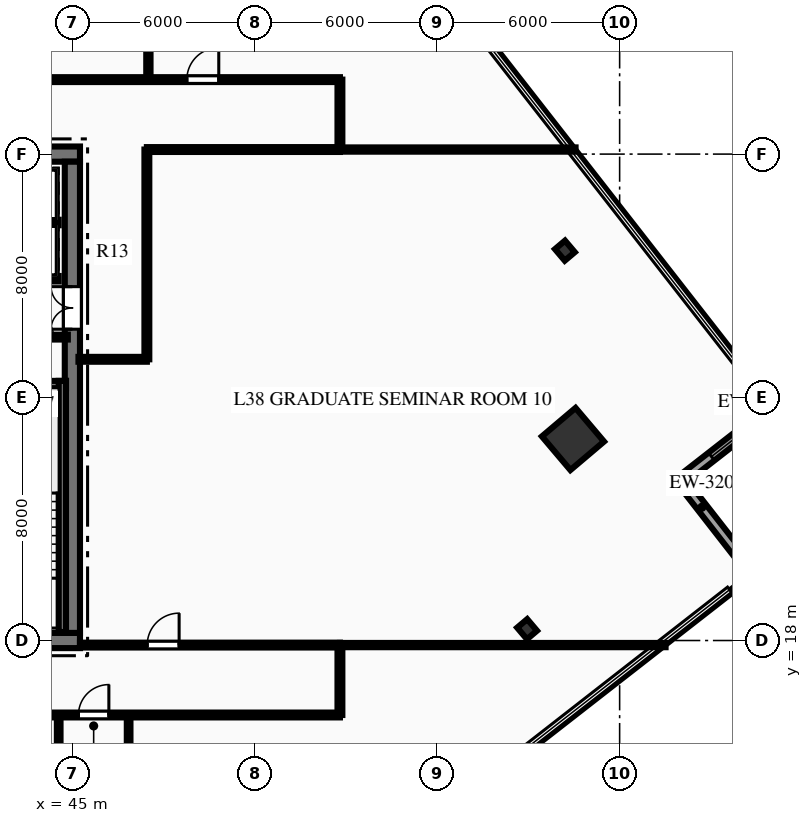
"""IFC4 building model, lengths in metres.
Left out: names, types, materials, properties, quantities, classifications, styles, units other than length and angle.
Written with IfcOpenShell. Run it as: python <this file> out.ifc"""

import sys

from ifc_helpers import new_model, si_unit, direction, frame, frame_2d, origin, origin_2d, place, context, subcontext, project, spatial, rectangle, hollow_rectangle, i_section, extrude, element, fill, save


model = new_model("IFC4")
c1 = context("Model", 3, precision=1e-05, world=origin(), true_north=direction((0.0, 1.0)))
c2 = subcontext(c1, "Body", "Model", "MODEL_VIEW")
j1 = project(units=[si_unit("LENGTHUNIT", "METRE"), si_unit("PLANEANGLEUNIT", "RADIAN")], contexts=[c1])
p1 = place(None, origin())
s1 = spatial("IfcSite", under=j1, at=p1, CompositionType="ELEMENT")
p2 = place(p1, origin())
s2 = spatial("IfcBuilding", under=s1, at=p2, CompositionType="ELEMENT")
p3 = place(p2, frame((0.0, 0.0, 155.7)))
s3 = spatial("IfcBuildingStorey", under=s2, at=p3, CompositionType="ELEMENT", Elevation=155.7)
p4 = place(p3, frame((26.75, 18.0, 0.0), z_axis=(0.0, 0.0, 1.0), x_axis=(1.0, 0.0, 0.0)))
e1 = element("IfcWall", 1, at=p4, inside=s3, PredefinedType="SHEAR", context=c2, shape_type="SweptSolid", body=[
    extrude(rectangle(XDim=18.5, YDim=0.5, at=frame_2d((9.25, 0.0))), origin(), (0.0, 0.0, 1.0), 3.75),
])
p5 = place(p4, frame((7.35, 0.0, 0.0)))
e2 = element("IfcOpeningElement", 2, at=p5, cuts=e1, PredefinedType="OPENING", context=c2, shape_type="SweptSolid", body=[
    extrude(rectangle(XDim=1.1, YDim=2.15, at=frame_2d((0.55, 1.075))), frame((0.0, 0.26, 0.0), z_axis=(0.0, -1.0, 0.0), x_axis=(1.0, 0.0, 0.0)), (0.0, 0.0, 1.0), 0.52),
])
p6 = place(p4, frame((10.05, 0.0, 0.0)))
e3 = element("IfcOpeningElement", 3, at=p6, cuts=e1, PredefinedType="OPENING", context=c2, shape_type="SweptSolid", body=[
    extrude(rectangle(XDim=1.1, YDim=2.15, at=frame_2d((0.55, 1.075))), frame((0.0, 0.26, 0.0), z_axis=(0.0, -1.0, 0.0), x_axis=(1.0, 0.0, 0.0)), (0.0, 0.0, 1.0), 0.52),
])
p7 = place(p3, frame((26.75, 34.0, 0.0), z_axis=(0.0, 0.0, 1.0), x_axis=(1.0, 0.0, 0.0)))
e4 = element("IfcWall", 4, at=p7, inside=s3, PredefinedType="SHEAR", context=c2, shape_type="SweptSolid", body=[
    extrude(rectangle(XDim=18.5, YDim=0.5, at=frame_2d((9.25, 0.0))), origin(), (0.0, 0.0, 1.0), 3.75),
])
p8 = place(p7, frame((13.935, 0.0, 0.0)))
e5 = element("IfcOpeningElement", 5, at=p8, cuts=e4, PredefinedType="OPENING", context=c2, shape_type="SweptSolid", body=[
    extrude(rectangle(XDim=1.1, YDim=2.15, at=frame_2d((0.55, 1.075))), frame((0.0, 0.26, 0.0), z_axis=(0.0, -1.0, 0.0), x_axis=(1.0, 0.0, 0.0)), (0.0, 0.0, 1.0), 0.52),
])
p9 = place(p7, frame((16.185, 0.0, 0.0)))
e6 = element("IfcOpeningElement", 6, at=p9, cuts=e4, PredefinedType="OPENING", context=c2, shape_type="SweptSolid", body=[
    extrude(rectangle(XDim=1.1, YDim=2.15, at=frame_2d((0.55, 1.075))), frame((0.0, 0.26, 0.0), z_axis=(0.0, -1.0, 0.0), x_axis=(1.0, 0.0, 0.0)), (0.0, 0.0, 1.0), 0.52),
])
p10 = place(p3, frame((45.0, 18.25, 0.0), z_axis=(0.0, 0.0, 1.0), x_axis=(0.0, 1.0, 0.0)))
e7 = element("IfcWall", 7, at=p10, inside=s3, PredefinedType="SHEAR", context=c2, shape_type="SweptSolid", body=[
    extrude(rectangle(XDim=15.5, YDim=0.5, at=frame_2d((7.75, 0.0))), origin(), (0.0, 0.0, 1.0), 3.75),
])
p11 = place(p10, frame((9.99, 0.0, 0.0)))
e8 = element("IfcOpeningElement", 8, at=p11, cuts=e7, PredefinedType="OPENING", context=c2, shape_type="SweptSolid", body=[
    extrude(rectangle(XDim=1.4, YDim=2.2, at=frame_2d((0.7, 1.1))), frame((0.0, 0.26, 0.0), z_axis=(0.0, -1.0, 0.0), x_axis=(1.0, 0.0, 0.0)), (0.0, 0.0, 1.0), 0.52),
])
p12 = place(p3, frame((40.81, 26.42, 0.0), z_axis=(0.0, 0.0, 1.0), x_axis=(1.0, 0.0, 0.0)))
e9 = element("IfcWall", 9, at=p12, inside=s3, PredefinedType="SHEAR", context=c2, shape_type="SweptSolid", body=[
    extrude(rectangle(XDim=3.98, YDim=0.24, at=frame_2d((1.99, 0.0))), origin(), (0.0, 0.0, 1.0), 3.75),
])
p13 = place(p3, frame((44.67, 18.28, 0.0), z_axis=(0.0, 0.0, 1.0), x_axis=(0.0, 1.0, 0.0)))
e10 = element("IfcWall", 10, at=p13, inside=s3, PredefinedType="SHEAR", context=c2, shape_type="SweptSolid", body=[
    extrude(rectangle(XDim=8.26, YDim=0.24, at=frame_2d((4.13, 0.0))), origin(), (0.0, 0.0, 1.0), 3.75),
])
p14 = place(p3, frame((61.465, 24.629, 0.0), z_axis=(0.0, 0.0, 1.0), x_axis=(0.763232469783, 0.646123979643, 0.0)))
e11 = element("IfcColumn", 11, at=p14, inside=s3, PredefinedType="COLUMN", context=c2, shape_type="SweptSolid", body=[
    extrude(hollow_rectangle(XDim=1.45, YDim=1.45, WallThickness=0.07, at=origin_2d()), origin(), (0.0, 0.0, 1.0), 3.75),
])
for number, where, z_axis, x_axis in (
    (12, (59.956, 18.373, 0.0), (0.0, 0.0, 1.0), (0.763, 0.646, 0.0)),
    (13, (61.199, 30.824, 0.0), (0.0, 0.0, 1.0), (0.763, 0.646, 0.0)),
):
    element("IfcColumn", number, at=place(p3, frame(where, z_axis=z_axis, x_axis=x_axis)), inside=s3, PredefinedType="COLUMN", context=c2, shape_type="SweptSolid", body=[
        extrude(i_section(OverallWidth=0.432, OverallDepth=0.498, WebThickness=0.056, FlangeThickness=0.089, at=origin_2d()), origin(), (0.0, 0.0, 1.0), 3.75),
    ])
p15 = place(p3, frame((67.477, 20.112, 0.0), z_axis=(0.0, 0.0, 1.0), x_axis=(-0.788562815333, -0.614954214778, 0.0)))
e14 = element("IfcWall", 14, at=p15, inside=s3, PredefinedType="STANDARD", context=c2, shape_type="SweptSolid", body=[
    extrude(rectangle(XDim=0.9, YDim=0.32, at=frame_2d((0.45, 0.0))), origin(), (0.0, 0.0, 1.0), 3.46),
])
p16 = place(p3, frame((65.017, 23.267, 0.0), z_axis=(0.0, 0.0, 1.0), x_axis=(0.614971082366, -0.788549660994, 0.0)))
e15 = element("IfcWall", 15, at=p16, inside=s3, PredefinedType="STANDARD", context=c2, shape_type="SweptSolid", body=[
    extrude(rectangle(XDim=4.0, YDim=0.32, at=frame_2d((2.0, 0.0))), origin(), (0.0, 0.0, 1.0), 3.46),
])
p17 = place(p3, frame((68.171, 25.726, 0.0), z_axis=(0.0, 0.0, 1.0), x_axis=(-0.788579258368, -0.614933129106, 0.0)))
e16 = element("IfcWall", 16, at=p17, inside=s3, PredefinedType="STANDARD", context=c2, shape_type="SweptSolid", body=[
    extrude(rectangle(XDim=4.0, YDim=0.32, at=frame_2d((2.0, 0.0))), origin(), (0.0, 0.0, 1.0), 3.46),
])
p18 = place(p17, frame((1.275, 0.0, 0.85)))
e17 = element("IfcOpeningElement", 17, at=p18, cuts=e16, PredefinedType="OPENING", context=c2, shape_type="SweptSolid", body=[
    extrude(rectangle(XDim=1.45, YDim=2.05, at=frame_2d((0.725, 1.025))), frame((0.0, 0.17, 0.0), z_axis=(0.0, -1.0, 0.0), x_axis=(1.0, 0.0, 0.0)), (0.0, 0.0, 1.0), 0.34),
])
p19 = place(p3, frame((40.8, 27.98, 0.0), z_axis=(0.0, 0.0, 1.0), x_axis=(1.0, 0.0, 0.0)))
e18 = element("IfcWall", 18, at=p19, inside=s3, PredefinedType="PARTITIONING", context=c2, shape_type="SweptSolid", body=[
    extrude(rectangle(XDim=4.05, YDim=0.16, at=frame_2d((2.025, 0.0))), origin(), (0.0, 0.0, 1.0), 3.46),
])
p20 = place(p19, frame((0.77, 0.0, 0.0)))
e19 = element("IfcOpeningElement", 19, at=p20, cuts=e18, PredefinedType="OPENING", context=c2, shape_type="SweptSolid", body=[
    extrude(rectangle(XDim=0.9, YDim=2.15, at=frame_2d((0.45, 1.075))), frame((0.0, 0.09, 0.0), z_axis=(0.0, -1.0, 0.0), x_axis=(1.0, 0.0, 0.0)), (0.0, 0.0, 1.0), 0.18),
])
p21 = place(p19, frame((2.68, 0.0, 0.0)))
e20 = element("IfcOpeningElement", 20, at=p21, cuts=e18, PredefinedType="OPENING", context=c2, shape_type="SweptSolid", body=[
    extrude(rectangle(XDim=0.9, YDim=2.15, at=frame_2d((0.45, 1.075))), frame((0.0, 0.09, 0.0), z_axis=(0.0, -1.0, 0.0), x_axis=(1.0, 0.0, 0.0)), (0.0, 0.0, 1.0), 0.18),
])
p22 = place(p3, frame((40.12, 29.9, 0.0), z_axis=(0.0, 0.0, 1.0), x_axis=(1.0, 0.0, 0.0)))
e21 = element("IfcWall", 21, at=p22, inside=s3, PredefinedType="PARTITIONING", context=c2, shape_type="SweptSolid", body=[
    extrude(rectangle(XDim=4.43, YDim=0.18, at=frame_2d((2.215, 0.0))), origin(), (0.0, 0.0, 1.0), 3.46),
])
p23 = place(p22, frame((0.565, 0.0, 0.0)))
e22 = element("IfcOpeningElement", 22, at=p23, cuts=e21, PredefinedType="OPENING", context=c2, shape_type="SweptSolid", body=[
    extrude(rectangle(XDim=1.1, YDim=2.15, at=frame_2d((0.55, 1.075))), frame((0.0, 0.1, 0.0), z_axis=(0.0, -1.0, 0.0), x_axis=(1.0, 0.0, 0.0)), (0.0, 0.0, 1.0), 0.2),
])
p24 = place(p22, frame((2.815, 0.0, 0.0)))
e23 = element("IfcOpeningElement", 23, at=p24, cuts=e21, PredefinedType="OPENING", context=c2, shape_type="SweptSolid", body=[
    extrude(rectangle(XDim=1.1, YDim=2.15, at=frame_2d((0.55, 1.075))), frame((0.0, 0.1, 0.0), z_axis=(0.0, -1.0, 0.0), x_axis=(1.0, 0.0, 0.0)), (0.0, 0.0, 1.0), 0.2),
])
p25 = place(p3, frame((40.12, 31.75, 0.0), z_axis=(0.0, 0.0, 1.0), x_axis=(1.0, 0.0, 0.0)))
e24 = element("IfcWall", 24, at=p25, inside=s3, PredefinedType="PARTITIONING", context=c2, shape_type="SweptSolid", body=[
    extrude(rectangle(XDim=4.43, YDim=0.18, at=frame_2d((2.215, 0.0))), origin(), (0.0, 0.0, 1.0), 3.46),
])
p26 = place(p3, frame((18.2, 15.55, 0.0), z_axis=(0.0, 0.0, 1.0), x_axis=(1.0, 0.0, 0.0)))
e25 = element("IfcWall", 25, at=p26, inside=s3, PredefinedType="PARTITIONING", context=c2, shape_type="SweptSolid", body=[
    extrude(rectangle(XDim=35.6, YDim=0.16, at=frame_2d((17.8, 0.0))), origin(), (0.0, 0.0, 1.0), 3.46),
])
p27 = place(p26, frame((22.45, 0.0, 0.0)))
e26 = element("IfcOpeningElement", 26, at=p27, cuts=e25, PredefinedType="OPENING", context=c2, shape_type="SweptSolid", body=[
    extrude(rectangle(XDim=0.9, YDim=2.15, at=frame_2d((0.45, 1.075))), frame((0.0, 0.09, 0.0), z_axis=(0.0, -1.0, 0.0), x_axis=(1.0, 0.0, 0.0)), (0.0, 0.0, 1.0), 0.18),
])
p28 = place(p26, frame((24.75, 0.0, 0.0)))
e27 = element("IfcOpeningElement", 27, at=p28, cuts=e25, PredefinedType="OPENING", context=c2, shape_type="SweptSolid", body=[
    extrude(rectangle(XDim=0.9, YDim=2.15, at=frame_2d((0.45, 1.075))), frame((0.0, 0.09, 0.0), z_axis=(0.0, -1.0, 0.0), x_axis=(1.0, 0.0, 0.0)), (0.0, 0.0, 1.0), 0.18),
])
p29 = place(p26, frame((27.0, 0.0, 0.0)))
e28 = element("IfcOpeningElement", 28, at=p29, cuts=e25, PredefinedType="OPENING", context=c2, shape_type="SweptSolid", body=[
    extrude(rectangle(XDim=1.0, YDim=2.15, at=frame_2d((0.5, 1.075))), frame((0.0, 0.09, 0.0), z_axis=(0.0, -1.0, 0.0), x_axis=(1.0, 0.0, 0.0)), (0.0, 0.0, 1.0), 0.18),
])
p30 = place(p26, frame((1.945, 0.0, 0.0)))
e29 = element("IfcOpeningElement", 29, at=p30, cuts=e25, PredefinedType="OPENING", context=c2, shape_type="SweptSolid", body=[
    extrude(rectangle(XDim=1.05, YDim=2.15, at=frame_2d((0.525, 1.075))), frame((0.0, 0.09, 0.0), z_axis=(0.0, -1.0, 0.0), x_axis=(1.0, 0.0, 0.0)), (0.0, 0.0, 1.0), 0.18),
])
p31 = place(p26, frame((7.995, 0.0, 0.0)))
e30 = element("IfcOpeningElement", 30, at=p31, cuts=e25, PredefinedType="OPENING", context=c2, shape_type="SweptSolid", body=[
    extrude(rectangle(XDim=1.05, YDim=2.15, at=frame_2d((0.525, 1.075))), frame((0.0, 0.09, 0.0), z_axis=(0.0, -1.0, 0.0), x_axis=(1.0, 0.0, 0.0)), (0.0, 0.0, 1.0), 0.18),
])
p32 = place(p26, frame((15.74, 0.0, 0.0)))
e31 = element("IfcOpeningElement", 31, at=p32, cuts=e25, PredefinedType="OPENING", context=c2, shape_type="SweptSolid", body=[
    extrude(rectangle(XDim=1.05, YDim=2.15, at=frame_2d((0.525, 1.075))), frame((0.0, 0.09, 0.0), z_axis=(0.0, -1.0, 0.0), x_axis=(1.0, 0.0, 0.0)), (0.0, 0.0, 1.0), 0.18),
])
p33 = place(p3, frame((45.25, 17.85, 0.0), z_axis=(0.0, 0.0, 1.0), x_axis=(1.0, 0.0, 0.0)))
e32 = element("IfcWall", 32, at=p33, inside=s3, PredefinedType="PARTITIONING", context=c2, shape_type="SweptSolid", body=[
    extrude(rectangle(XDim=8.55, YDim=0.16, at=frame_2d((4.275, 0.0))), origin(), (0.0, 0.0, 1.0), 2.998),
])
p34 = place(p33, frame((2.211, 0.0, 0.0)))
e33 = element("IfcOpeningElement", 33, at=p34, cuts=e32, PredefinedType="OPENING", context=c2, shape_type="SweptSolid", body=[
    extrude(rectangle(XDim=1.05, YDim=2.15, at=frame_2d((0.525, 1.075))), frame((0.0, 0.09, 0.0), z_axis=(0.0, -1.0, 0.0), x_axis=(1.0, 0.0, 0.0)), (0.0, 0.0, 1.0), 0.18),
])
p35 = place(p3, frame((18.2, 36.45, 0.0), z_axis=(0.0, 0.0, 1.0), x_axis=(1.0, 0.0, 0.0)))
e34 = element("IfcWall", 34, at=p35, inside=s3, PredefinedType="PARTITIONING", context=c2, shape_type="SweptSolid", body=[
    extrude(rectangle(XDim=35.6, YDim=0.16, at=frame_2d((17.8, 0.0))), origin(), (0.0, 0.0, 1.0), 3.46),
])
p36 = place(p35, frame((0.957, 0.0, 0.0)))
e35 = element("IfcOpeningElement", 35, at=p36, cuts=e34, PredefinedType="OPENING", context=c2, shape_type="SweptSolid", body=[
    extrude(rectangle(XDim=1.05, YDim=2.15, at=frame_2d((0.525, 1.075))), frame((0.0, 0.09, 0.0), z_axis=(0.0, -1.0, 0.0), x_axis=(1.0, 0.0, 0.0)), (0.0, 0.0, 1.0), 0.18),
])
p37 = place(p35, frame((9.335, 0.0, 0.0)))
e36 = element("IfcOpeningElement", 36, at=p37, cuts=e34, PredefinedType="OPENING", context=c2, shape_type="SweptSolid", body=[
    extrude(rectangle(XDim=1.05, YDim=2.15, at=frame_2d((0.525, 1.075))), frame((0.0, 0.09, 0.0), z_axis=(0.0, -1.0, 0.0), x_axis=(1.0, 0.0, 0.0)), (0.0, 0.0, 1.0), 0.18),
])
p38 = place(p35, frame((17.675, 0.0, 0.0)))
e37 = element("IfcOpeningElement", 37, at=p38, cuts=e34, PredefinedType="OPENING", context=c2, shape_type="SweptSolid", body=[
    extrude(rectangle(XDim=1.05, YDim=2.15, at=frame_2d((0.525, 1.075))), frame((0.0, 0.09, 0.0), z_axis=(0.0, -1.0, 0.0), x_axis=(1.0, 0.0, 0.0)), (0.0, 0.0, 1.0), 0.18),
])
p39 = place(p35, frame((22.875, 0.0, 0.0)))
e38 = element("IfcOpeningElement", 38, at=p39, cuts=e34, PredefinedType="OPENING", context=c2, shape_type="SweptSolid", body=[
    extrude(rectangle(XDim=1.05, YDim=2.15, at=frame_2d((0.525, 1.075))), frame((0.0, 0.09, 0.0), z_axis=(0.0, -1.0, 0.0), x_axis=(1.0, 0.0, 0.0)), (0.0, 0.0, 1.0), 0.18),
])
p40 = place(p35, frame((30.565, 0.0, 0.0)))
e39 = element("IfcOpeningElement", 39, at=p40, cuts=e34, PredefinedType="OPENING", context=c2, shape_type="SweptSolid", body=[
    extrude(rectangle(XDim=1.05, YDim=2.15, at=frame_2d((0.525, 1.075))), frame((0.0, 0.09, 0.0), z_axis=(0.0, -1.0, 0.0), x_axis=(1.0, 0.0, 0.0)), (0.0, 0.0, 1.0), 0.18),
])
p41 = place(p3, frame((47.45, 34.15, 0.0), z_axis=(0.0, 0.0, 1.0), x_axis=(1.0, 0.0, 0.0)))
e40 = element("IfcWall", 40, at=p41, inside=s3, PredefinedType="PARTITIONING", context=c2, shape_type="SweptSolid", body=[
    extrude(rectangle(XDim=6.35, YDim=0.16, at=frame_2d((3.175, 0.0))), origin(), (0.0, 0.0, 1.0), 3.46),
])
p42 = place(p3, frame((47.45, 27.25, 0.0), z_axis=(0.0, 0.0, 1.0), x_axis=(0.0, 1.0, 0.0)))
e41 = element("IfcWall", 41, at=p42, inside=s3, PredefinedType="PARTITIONING", context=c2, shape_type="SweptSolid", body=[
    extrude(rectangle(XDim=6.9, YDim=0.16, at=frame_2d((3.45, 0.0))), origin(), (0.0, 0.0, 1.0), 3.46),
])
p43 = place(p3, frame((45.2, 27.25, 0.0), z_axis=(0.0, 0.0, 1.0), x_axis=(1.0, 0.0, 0.0)))
e42 = element("IfcWall", 42, at=p43, inside=s3, PredefinedType="PARTITIONING", context=c2, shape_type="SweptSolid", body=[
    extrude(rectangle(XDim=2.25, YDim=0.16, at=frame_2d((1.125, 0.0))), origin(), (0.0, 0.0, 1.0), 3.46),
])
for number, where, z_axis, x_axis in (
    (43, (53.8, 15.55, 0.0), (0.0, 0.0, 1.0), (0.0, 1.0, 0.0)),
    (44, (53.8, 34.15, 0.0), (0.0, 0.0, 1.0), (0.0, 1.0, 0.0)),
):
    element("IfcWall", number, at=place(p3, frame(where, z_axis=z_axis, x_axis=x_axis)), inside=s3, PredefinedType="PARTITIONING", context=c2, shape_type="SweptSolid", body=[
        extrude(rectangle(XDim=2.3, YDim=0.16, at=frame_2d((1.15, 0.0))), origin(), (0.0, 0.0, 1.0), 3.46),
    ])
for number, where, z_axis, x_axis in (
    (45, (44.55, 11.65, 0.0), (0.0, 0.0, 1.0), (0.0, 1.0, 0.0)),
    (46, (46.85, 11.65, 0.0), (0.0, 0.0, 1.0), (0.0, 1.0, 0.0)),
):
    element("IfcWall", number, at=place(p3, frame(where, z_axis=z_axis, x_axis=x_axis)), inside=s3, PredefinedType="PARTITIONING", context=c2, shape_type="SweptSolid", body=[
        extrude(rectangle(XDim=3.9, YDim=0.12, at=frame_2d((1.95, 0.0))), origin(), (0.0, 0.0, 1.0), 3.46),
    ])
p44 = place(p3, frame((53.8, 17.85, 0.0), z_axis=(0.0, 0.0, 1.0), x_axis=(1.0, 0.0, 0.0)))
e47 = element("IfcWall", 47, at=p44, inside=s3, PredefinedType="PARTITIONING", context=c2, shape_type="SweptSolid", body=[
    extrude(rectangle(XDim=10.711, YDim=0.14, at=frame_2d((5.355, 0.0))), origin(), (0.0, 0.0, 1.0), 3.46),
])
p45 = place(p3, frame((53.8, 34.15, 0.0), z_axis=(0.0, 0.0, 1.0), x_axis=(1.0, 0.0, 0.0)))
e48 = element("IfcWall", 48, at=p45, inside=s3, PredefinedType="PARTITIONING", context=c2, shape_type="SweptSolid", body=[
    extrude(rectangle(XDim=7.751, YDim=0.14, at=frame_2d((3.875, 0.0))), origin(), (0.0, 0.0, 1.0), 3.46),
])
p46 = place(p3, frame((47.5, 36.45, 0.0), z_axis=(0.0, 0.0, 1.0), x_axis=(0.0, 1.0, 0.0)))
e49 = element("IfcWall", 49, at=p46, inside=s3, PredefinedType="PARTITIONING", context=c2, shape_type="SweptSolid", body=[
    extrude(rectangle(XDim=15.717, YDim=0.14, at=frame_2d((7.858, 0.0))), origin(), (0.0, 0.0, 1.0), 3.46),
])
p47 = place(p18, origin())
e50 = element("IfcWindow", 50, at=p47, inside=s3, PartitioningType="SINGLE_PANEL", PredefinedType="WINDOW", context=c2, shape_type="SweptSolid", body=[
    extrude(rectangle(XDim=1.45, YDim=2.05, at=frame_2d((0.725, 1.025))), frame((0.0, 0.03, 0.0), z_axis=(0.0, -1.0, 0.0), x_axis=(1.0, 0.0, 0.0)), (0.0, 0.0, 1.0), 0.06),
])
fill(e17, e50)
p48 = place(p21, origin())
e51 = element("IfcDoor", 51, at=p48, inside=s3, OperationType="SINGLE_SWING_LEFT", PredefinedType="DOOR", context=c2, shape_type="SweptSolid", body=[
    extrude(rectangle(XDim=0.9, YDim=2.15, at=frame_2d((0.45, 1.075))), frame((0.0, 0.025, 0.0), z_axis=(0.0, -1.0, 0.0), x_axis=(1.0, 0.0, 0.0)), (0.0, 0.0, 1.0), 0.05),
])
fill(e20, e51)
p49 = place(p11, origin())
e52 = element("IfcDoor", 52, at=p49, inside=s3, OperationType="DOUBLE_DOOR_SINGLE_SWING", PredefinedType="DOOR", context=c2, shape_type="SweptSolid", body=[
    extrude(rectangle(XDim=1.4, YDim=2.2, at=frame_2d((0.7, 1.1))), frame((0.0, 0.025, 0.0), z_axis=(0.0, -1.0, 0.0), x_axis=(1.0, 0.0, 0.0)), (0.0, 0.0, 1.0), 0.05),
])
fill(e8, e52)
p50 = place(p29, origin())
e53 = element("IfcDoor", 53, at=p50, inside=s3, OperationType="SINGLE_SWING_RIGHT", PredefinedType="DOOR", context=c2, shape_type="SweptSolid", body=[
    extrude(rectangle(XDim=1.0, YDim=2.15, at=frame_2d((0.5, 1.075))), frame((0.0, 0.025, 0.0), z_axis=(0.0, -1.0, 0.0), x_axis=(1.0, 0.0, 0.0)), (0.0, 0.0, 1.0), 0.05),
])
fill(e28, e53)
p51 = place(p40, origin())
e54 = element("IfcDoor", 54, at=p51, inside=s3, OperationType="SINGLE_SWING_RIGHT", PredefinedType="DOOR", context=c2, shape_type="SweptSolid", body=[
    extrude(rectangle(XDim=1.05, YDim=2.15, at=frame_2d((0.525, 1.075))), frame((0.0, 0.025, 0.0), z_axis=(0.0, -1.0, 0.0), x_axis=(1.0, 0.0, 0.0)), (0.0, 0.0, 1.0), 0.05),
])
fill(e39, e54)
p52 = place(p34, origin())
e55 = element("IfcDoor", 55, at=p52, inside=s3, OperationType="SINGLE_SWING_RIGHT", PredefinedType="DOOR", context=c2, shape_type="SweptSolid", body=[
    extrude(rectangle(XDim=1.05, YDim=2.15, at=frame_2d((0.525, 1.075))), frame((0.0, 0.025, 0.0), z_axis=(0.0, -1.0, 0.0), x_axis=(1.0, 0.0, 0.0)), (0.0, 0.0, 1.0), 0.05),
])
fill(e33, e55)
save(model, sys.argv[1])
